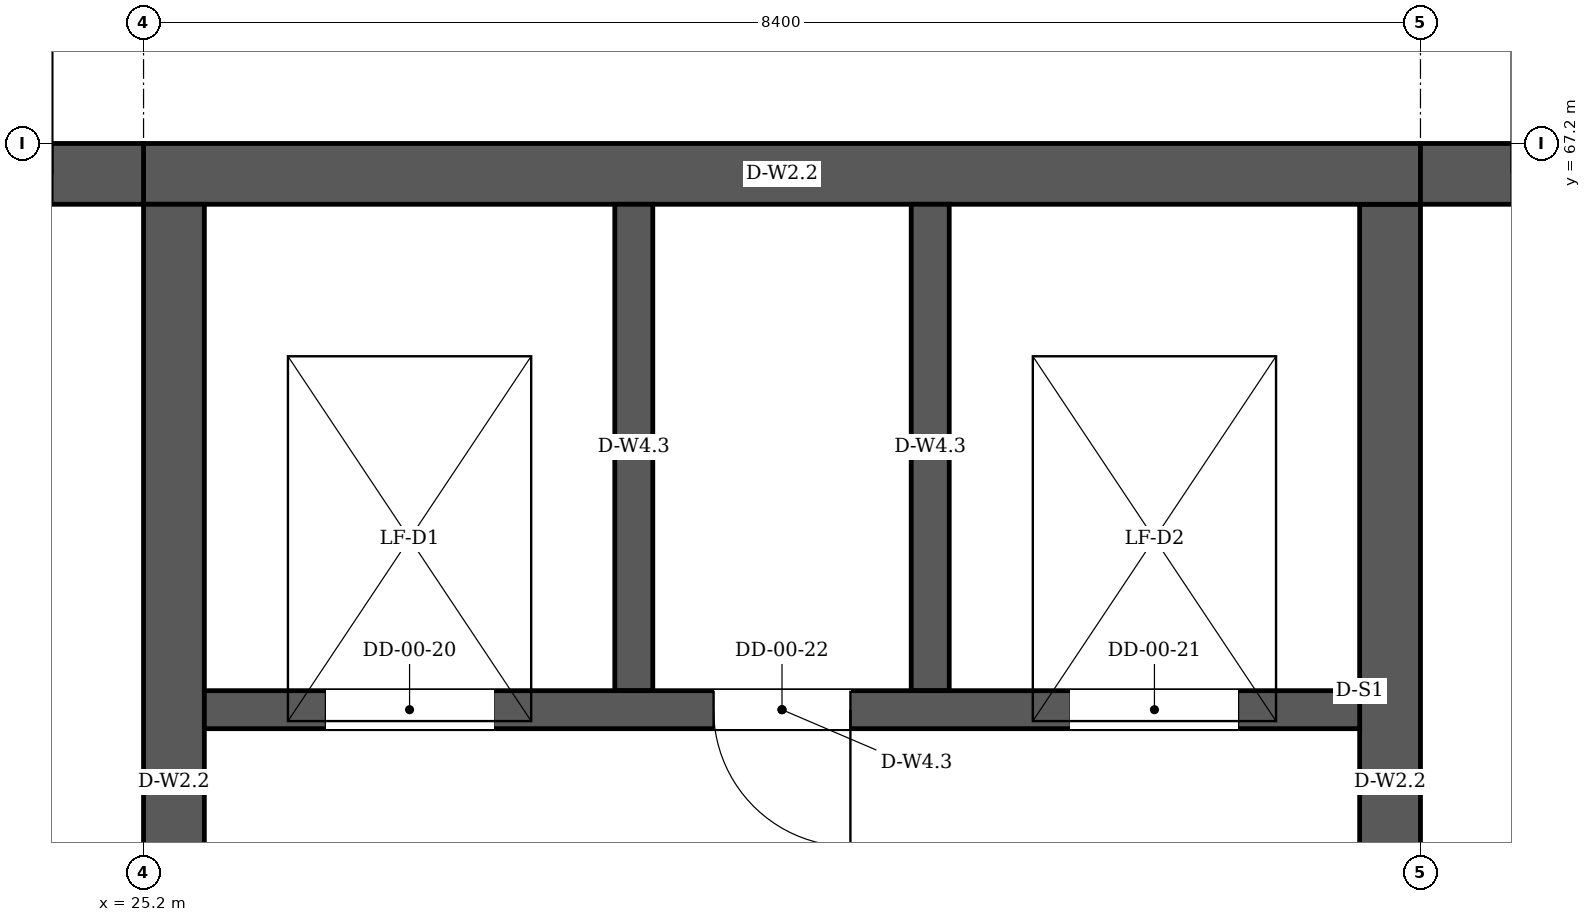
"""IFC4 building model, lengths in metres.
Left out: names, types, materials, properties, quantities, classifications, styles, units other than length and angle.
Written with IfcOpenShell. Run it as: python <this file> out.ifc"""

import sys

from ifc_helpers import new_model, si_unit, direction, frame, frame_2d, origin, place, context, subcontext, project, spatial, rectangle, extrude, element, fill, save


model = new_model("IFC4")
c1 = context("Model", 3, precision=1e-05, world=origin(), true_north=direction((0.0, 1.0)))
c2 = subcontext(c1, "Body", "Model", "MODEL_VIEW")
j1 = project(units=[si_unit("LENGTHUNIT", "METRE"), si_unit("PLANEANGLEUNIT", "RADIAN")], contexts=[c1])
p1 = place(None, origin())
s1 = spatial("IfcSite", under=j1, at=p1, CompositionType="ELEMENT")
p2 = place(p1, origin())
s2 = spatial("IfcBuilding", under=s1, at=p2, CompositionType="ELEMENT")
p3 = place(p2, origin())
s3 = spatial("IfcBuildingStorey", under=s2, at=p3, CompositionType="ELEMENT", Elevation=0.0)
p4 = place(p3, frame((25.2, 67.0, 0.0), z_axis=(0.0, 0.0, 1.0), x_axis=(1.0, 0.0, 0.0)))
e1 = element("IfcWall", 1, at=p4, inside=s3, PredefinedType="SOLIDWALL", context=c2, shape_type="SweptSolid", body=[
    extrude(rectangle(XDim=8.4, YDim=0.4, at=frame_2d((4.2, 0.0))), origin(), (0.0, 0.0, 1.0), 5.72),
])
p5 = place(p3, frame((25.4, 59.2, 0.0), z_axis=(0.0, 0.0, 1.0), x_axis=(0.0, 1.0, 0.0)))
e2 = element("IfcWall", 2, at=p5, inside=s3, PredefinedType="SOLIDWALL", context=c2, shape_type="SweptSolid", body=[
    extrude(rectangle(XDim=7.6, YDim=0.4, at=frame_2d((3.8, 0.0))), origin(), (0.0, 0.0, 1.0), 5.72),
])
p6 = place(p5, frame((0.5, 0.0, 0.0)))
e3 = element("IfcOpeningElement", 3, at=p6, cuts=e2, PredefinedType="OPENING", context=c2, shape_type="SweptSolid", body=[
    extrude(rectangle(XDim=1.2, YDim=2.1, at=frame_2d((0.6, 1.05))), frame((0.0, 0.21, 0.0), z_axis=(0.0, -1.0, 0.0), x_axis=(1.0, 0.0, 0.0)), (0.0, 0.0, 1.0), 0.42),
])
p7 = place(p3, frame((33.4, 59.2, 0.0), z_axis=(0.0, 0.0, 1.0), x_axis=(0.0, 1.0, 0.0)))
e4 = element("IfcWall", 4, at=p7, inside=s3, PredefinedType="SOLIDWALL", context=c2, shape_type="SweptSolid", body=[
    extrude(rectangle(XDim=7.6, YDim=0.4, at=frame_2d((3.8, 0.0))), origin(), (0.0, 0.0, 1.0), 5.72),
])
p8 = place(p7, frame((0.5, 0.0, 0.0)))
e5 = element("IfcOpeningElement", 5, at=p8, cuts=e4, PredefinedType="OPENING", context=c2, shape_type="SweptSolid", body=[
    extrude(rectangle(XDim=1.2, YDim=2.1, at=frame_2d((0.6, 1.05))), frame((0.0, 0.21, 0.0), z_axis=(0.0, -1.0, 0.0), x_axis=(1.0, 0.0, 0.0)), (0.0, 0.0, 1.0), 0.42),
])
p9 = place(p3, frame((25.6, 63.475, -1.4), z_axis=(0.0, 0.0, 1.0), x_axis=(1.0, 0.0, 0.0)))
e6 = element("IfcWall", 6, at=p9, inside=s3, PredefinedType="SOLIDWALL", context=c2, shape_type="SweptSolid", body=[
    extrude(rectangle(XDim=7.6, YDim=0.25, at=frame_2d((3.8, 0.0))), origin(), (0.0, 0.0, 1.0), 7.12),
])
p10 = place(p9, frame((0.8, 0.0, 1.4)))
e7 = element("IfcOpeningElement", 7, at=p10, cuts=e6, PredefinedType="OPENING", context=c2, shape_type="SweptSolid", body=[
    extrude(rectangle(XDim=1.1, YDim=2.1, at=frame_2d((0.55, 1.05))), frame((0.0, 0.135, 0.0), z_axis=(0.0, -1.0, 0.0), x_axis=(1.0, 0.0, 0.0)), (0.0, 0.0, 1.0), 0.27),
])
p11 = place(p9, frame((5.7, 0.0, 1.4)))
e8 = element("IfcOpeningElement", 8, at=p11, cuts=e6, PredefinedType="OPENING", context=c2, shape_type="SweptSolid", body=[
    extrude(rectangle(XDim=1.1, YDim=2.1, at=frame_2d((0.55, 1.05))), frame((0.0, 0.135, 0.0), z_axis=(0.0, -1.0, 0.0), x_axis=(1.0, 0.0, 0.0)), (0.0, 0.0, 1.0), 0.27),
])
p12 = place(p9, frame((3.35, 0.0, 1.4)))
e9 = element("IfcOpeningElement", 9, at=p12, cuts=e6, PredefinedType="OPENING", context=c2, shape_type="SweptSolid", body=[
    extrude(rectangle(XDim=0.9, YDim=2.1, at=frame_2d((0.45, 1.05))), frame((0.0, 0.135, 0.0), z_axis=(0.0, -1.0, 0.0), x_axis=(1.0, 0.0, 0.0)), (0.0, 0.0, 1.0), 0.27),
])
for number, where, z_axis, x_axis in (
    (10, (28.425, 63.6, -1.4), (0.0, 0.0, 1.0), (0.0, 1.0, 0.0)),
    (11, (30.375, 63.6, -1.4), (0.0, 0.0, 1.0), (0.0, 1.0, 0.0)),
):
    element("IfcWall", number, at=place(p3, frame(where, z_axis=z_axis, x_axis=x_axis)), inside=s3, PredefinedType="SOLIDWALL", context=c2, shape_type="SweptSolid", body=[
        extrude(rectangle(XDim=3.2, YDim=0.25, at=frame_2d((1.6, 0.0))), origin(), (0.0, 0.0, 1.0), 7.12),
    ])
p13 = place(p3, frame((16.8, 67.0, 0.0), z_axis=(0.0, 0.0, 1.0), x_axis=(1.0, 0.0, 0.0)))
e12 = element("IfcWall", 12, at=p13, inside=s3, PredefinedType="SOLIDWALL", context=c2, shape_type="SweptSolid", body=[
    extrude(rectangle(XDim=8.4, YDim=0.4, at=frame_2d((4.2, 0.0))), origin(), (0.0, 0.0, 1.0), 5.22),
])
p14 = place(p13, frame((0.6, 0.0, 0.0)))
e13 = element("IfcOpeningElement", 13, at=p14, cuts=e12, PredefinedType="OPENING", context=c2, shape_type="SweptSolid", body=[
    extrude(rectangle(XDim=1.8, YDim=2.4, at=frame_2d((0.9, 1.2))), frame((0.0, 0.21, 0.0), z_axis=(0.0, -1.0, 0.0), x_axis=(1.0, 0.0, 0.0)), (0.0, 0.0, 1.0), 0.42),
])
p15 = place(p13, frame((6.0, 0.0, 0.0)))
e14 = element("IfcOpeningElement", 14, at=p15, cuts=e12, PredefinedType="OPENING", context=c2, shape_type="SweptSolid", body=[
    extrude(rectangle(XDim=1.8, YDim=2.4, at=frame_2d((0.9, 1.2))), frame((0.0, 0.21, 0.0), z_axis=(0.0, -1.0, 0.0), x_axis=(1.0, 0.0, 0.0)), (0.0, 0.0, 1.0), 0.42),
])
p16 = place(p3, frame((33.6, 67.0, 0.0), z_axis=(0.0, 0.0, 1.0), x_axis=(1.0, 0.0, 0.0)))
e15 = element("IfcWall", 15, at=p16, inside=s3, PredefinedType="SOLIDWALL", context=c2, shape_type="SweptSolid", body=[
    extrude(rectangle(XDim=8.4, YDim=0.4, at=frame_2d((4.2, 0.0))), origin(), (0.0, 0.0, 1.0), 5.22),
])
p17 = place(p16, frame((0.6, 0.0, 0.0)))
e16 = element("IfcOpeningElement", 16, at=p17, cuts=e15, PredefinedType="OPENING", context=c2, shape_type="SweptSolid", body=[
    extrude(rectangle(XDim=1.8, YDim=2.4, at=frame_2d((0.9, 1.2))), frame((0.0, 0.21, 0.0), z_axis=(0.0, -1.0, 0.0), x_axis=(1.0, 0.0, 0.0)), (0.0, 0.0, 1.0), 0.42),
])
p18 = place(p16, frame((6.0, 0.0, 0.0)))
e17 = element("IfcOpeningElement", 17, at=p18, cuts=e15, PredefinedType="OPENING", context=c2, shape_type="SweptSolid", body=[
    extrude(rectangle(XDim=1.8, YDim=2.4, at=frame_2d((0.9, 1.2))), frame((0.0, 0.21, 0.0), z_axis=(0.0, -1.0, 0.0), x_axis=(1.0, 0.0, 0.0)), (0.0, 0.0, 1.0), 0.42),
])
p19 = place(p10, origin())
e18 = element("IfcDoor", 18, at=p19, inside=s3, OperationType="DOUBLE_DOOR_SLIDING", PredefinedType="DOOR", context=c2, shape_type="SweptSolid", body=[
    extrude(rectangle(XDim=1.1, YDim=2.1, at=frame_2d((0.55, 1.05))), frame((0.0, 0.025, 0.0), z_axis=(0.0, -1.0, 0.0), x_axis=(1.0, 0.0, 0.0)), (0.0, 0.0, 1.0), 0.05),
])
fill(e7, e18)
p20 = place(p11, origin())
e19 = element("IfcDoor", 19, at=p20, inside=s3, OperationType="DOUBLE_DOOR_SLIDING", PredefinedType="DOOR", context=c2, shape_type="SweptSolid", body=[
    extrude(rectangle(XDim=1.1, YDim=2.1, at=frame_2d((0.55, 1.05))), frame((0.0, 0.025, 0.0), z_axis=(0.0, -1.0, 0.0), x_axis=(1.0, 0.0, 0.0)), (0.0, 0.0, 1.0), 0.05),
])
fill(e8, e19)
p21 = place(p12, origin())
e20 = element("IfcDoor", 20, at=p21, inside=s3, OperationType="SINGLE_SWING_LEFT", PredefinedType="DOOR", context=c2, shape_type="SweptSolid", body=[
    extrude(rectangle(XDim=0.9, YDim=2.1, at=frame_2d((0.45, 1.05))), frame((0.0, 0.025, 0.0), z_axis=(0.0, -1.0, 0.0), x_axis=(1.0, 0.0, 0.0)), (0.0, 0.0, 1.0), 0.05),
])
fill(e9, e20)
save(model, sys.argv[1])
